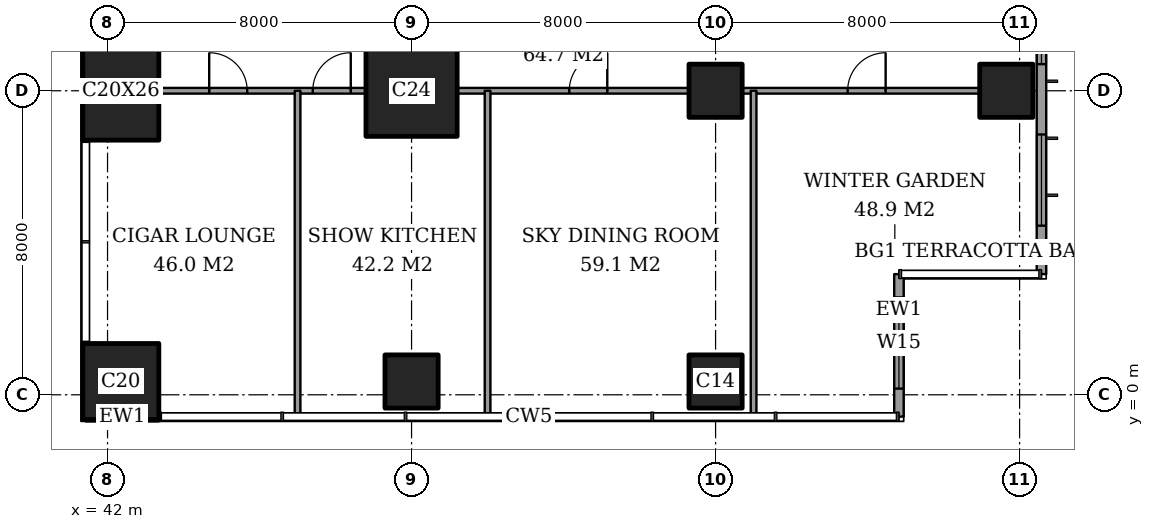
"""IFC4 building model, lengths in metres.
Left out: names, types, materials, properties, quantities, classifications, styles, units other than length and angle.
Written with IfcOpenShell. Run it as: python <this file> out.ifc"""

import sys

from ifc_helpers import new_model, si_unit, direction, frame, frame_2d, origin, origin_2d, place, context, subcontext, project, spatial, rectangle, extrude, element, fill, save


model = new_model("IFC4")
c1 = context("Model", 3, precision=1e-05, world=origin(), true_north=direction((0.0, 1.0)))
c2 = subcontext(c1, "Body", "Model", "MODEL_VIEW")
j1 = project(units=[si_unit("LENGTHUNIT", "METRE"), si_unit("PLANEANGLEUNIT", "RADIAN")], contexts=[c1])
p1 = place(None, origin())
s1 = spatial("IfcSite", under=j1, at=p1, CompositionType="ELEMENT")
p2 = place(p1, origin())
s2 = spatial("IfcBuilding", under=s1, at=p2, CompositionType="ELEMENT")
p3 = place(p2, frame((0.0, 0.0, 287.1)))
s3 = spatial("IfcBuildingStorey", under=s2, at=p3, CompositionType="ELEMENT", Elevation=287.1)
p4 = place(p3, frame((42.35, 0.35, 0.0), z_axis=(0.0, 0.0, 1.0), x_axis=(1.0, 0.0, 0.0)))
e1 = element("IfcColumn", 1, at=p4, inside=s3, PredefinedType="COLUMN", context=c2, shape_type="SweptSolid", body=[
    extrude(rectangle(XDim=2.0, YDim=2.0, at=origin_2d()), origin(), (0.0, 0.0, 1.0), 4.5),
])
p5 = place(p3, frame((42.35, 8.0, 0.0), z_axis=(0.0, 0.0, 1.0), x_axis=(1.0, 0.0, 0.0)))
e2 = element("IfcColumn", 2, at=p5, inside=s3, PredefinedType="COLUMN", context=c2, shape_type="SweptSolid", body=[
    extrude(rectangle(XDim=2.0, YDim=2.6, at=origin_2d()), origin(), (0.0, 0.0, 1.0), 4.5),
])
p6 = place(p3, frame((50.0, 0.35, 0.0), z_axis=(0.0, 0.0, 1.0), x_axis=(1.0, 0.0, 0.0)))
e3 = element("IfcColumn", 3, at=p6, inside=s3, PredefinedType="COLUMN", context=c2, shape_type="SweptSolid", body=[
    extrude(rectangle(XDim=1.4, YDim=1.4, at=origin_2d()), origin(), (0.0, 0.0, 1.0), 4.5),
])
p7 = place(p3, frame((50.0, 8.0, 0.0), z_axis=(0.0, 0.0, 1.0), x_axis=(1.0, 0.0, 0.0)))
e4 = element("IfcColumn", 4, at=p7, inside=s3, PredefinedType="COLUMN", context=c2, shape_type="SweptSolid", body=[
    extrude(rectangle(XDim=2.4, YDim=2.4, at=origin_2d()), origin(), (0.0, 0.0, 1.0), 4.5),
])
for number, where, z_axis, x_axis in (
    (5, (58.0, 0.35, 0.0), (0.0, 0.0, 1.0), (1.0, 0.0, 0.0)),
    (6, (58.0, 8.0, 0.0), (0.0, 0.0, 1.0), (1.0, 0.0, 0.0)),
    (7, (65.65, 8.0, 0.0), (0.0, 0.0, 1.0), (1.0, 0.0, 0.0)),
):
    element("IfcColumn", number, at=place(p3, frame(where, z_axis=z_axis, x_axis=x_axis)), inside=s3, PredefinedType="COLUMN", context=c2, shape_type="SweptSolid", body=[
        extrude(rectangle(XDim=1.4, YDim=1.4, at=origin_2d()), origin(), (0.0, 0.0, 1.0), 4.5),
    ])
p8 = place(p3, frame((41.425, -0.575, 0.0), z_axis=(0.0, 0.0, 1.0), x_axis=(1.0, 0.0, 0.0)))
e8 = element("IfcWall", 8, at=p8, inside=s3, PredefinedType="SOLIDWALL", context=c2, shape_type="SweptSolid", body=[
    extrude(rectangle(XDim=1.925, YDim=0.25, at=frame_2d((0.962, 0.0))), origin(), (0.0, 0.0, 1.0), 4.5),
])
p9 = place(p3, frame((62.825, -0.575, 0.0), z_axis=(0.0, 0.0, 1.0), x_axis=(0.0, 1.0, 0.0)))
e9 = element("IfcWall", 9, at=p9, inside=s3, PredefinedType="SOLIDWALL", context=c2, shape_type="SweptSolid", body=[
    extrude(rectangle(XDim=3.75, YDim=0.25, at=frame_2d((1.875, 0.0))), origin(), (0.0, 0.0, 1.0), 4.5),
])
p10 = place(p9, frame((0.738, 0.0, 0.6)))
e10 = element("IfcOpeningElement", 10, at=p10, cuts=e9, PredefinedType="OPENING", context=c2, shape_type="SweptSolid", body=[
    extrude(rectangle(XDim=2.4, YDim=2.8, at=frame_2d((1.2, 1.4))), frame((0.0, 0.135, 0.0), z_axis=(0.0, -1.0, 0.0), x_axis=(1.0, 0.0, 0.0)), (0.0, 0.0, 1.0), 0.27),
])
p11 = place(p3, frame((66.575, 3.175, 0.0), z_axis=(0.0, 0.0, 1.0), x_axis=(0.0, 1.0, 0.0)))
e11 = element("IfcWall", 11, at=p11, inside=s3, PredefinedType="SOLIDWALL", context=c2, shape_type="SweptSolid", body=[
    extrude(rectangle(XDim=41.65, YDim=0.25, at=frame_2d((20.825, 0.0))), origin(), (0.0, 0.0, 1.0), 4.5),
])
p12 = place(p11, frame((1.275, 0.0, 0.6)))
e12 = element("IfcOpeningElement", 12, at=p12, cuts=e11, PredefinedType="OPENING", context=c2, shape_type="SweptSolid", body=[
    extrude(rectangle(XDim=2.4, YDim=2.8, at=frame_2d((1.2, 1.4))), frame((0.0, 0.135, 0.0), z_axis=(0.0, -1.0, 0.0), x_axis=(1.0, 0.0, 0.0)), (0.0, 0.0, 1.0), 0.27),
])
p13 = place(p11, frame((5.525, 0.0, 0.6)))
e13 = element("IfcOpeningElement", 13, at=p13, cuts=e11, PredefinedType="OPENING", context=c2, shape_type="SweptSolid", body=[
    extrude(rectangle(XDim=1.2, YDim=2.8, at=frame_2d((0.6, 1.4))), frame((0.0, 0.135, 0.0), z_axis=(0.0, -1.0, 0.0), x_axis=(1.0, 0.0, 0.0)), (0.0, 0.0, 1.0), 0.27),
])
p14 = place(p11, frame((9.425, 0.0, 0.6)))
e14 = element("IfcOpeningElement", 14, at=p14, cuts=e11, PredefinedType="OPENING", context=c2, shape_type="SweptSolid", body=[
    extrude(rectangle(XDim=2.4, YDim=2.8, at=frame_2d((1.2, 1.4))), frame((0.0, 0.135, 0.0), z_axis=(0.0, -1.0, 0.0), x_axis=(1.0, 0.0, 0.0)), (0.0, 0.0, 1.0), 0.27),
])
p15 = place(p11, frame((14.525, 0.0, 0.6)))
e15 = element("IfcOpeningElement", 15, at=p15, cuts=e11, PredefinedType="OPENING", context=c2, shape_type="SweptSolid", body=[
    extrude(rectangle(XDim=2.4, YDim=2.8, at=frame_2d((1.2, 1.4))), frame((0.0, 0.135, 0.0), z_axis=(0.0, -1.0, 0.0), x_axis=(1.0, 0.0, 0.0)), (0.0, 0.0, 1.0), 0.27),
])
p16 = place(p11, frame((17.725, 0.0, 0.6)))
e16 = element("IfcOpeningElement", 16, at=p16, cuts=e11, PredefinedType="OPENING", context=c2, shape_type="SweptSolid", body=[
    extrude(rectangle(XDim=2.4, YDim=2.8, at=frame_2d((1.2, 1.4))), frame((0.0, 0.135, 0.0), z_axis=(0.0, -1.0, 0.0), x_axis=(1.0, 0.0, 0.0)), (0.0, 0.0, 1.0), 0.27),
])
p17 = place(p11, frame((21.525, 0.0, 0.6)))
e17 = element("IfcOpeningElement", 17, at=p17, cuts=e11, PredefinedType="OPENING", context=c2, shape_type="SweptSolid", body=[
    extrude(rectangle(XDim=2.4, YDim=2.8, at=frame_2d((1.2, 1.4))), frame((0.0, 0.135, 0.0), z_axis=(0.0, -1.0, 0.0), x_axis=(1.0, 0.0, 0.0)), (0.0, 0.0, 1.0), 0.27),
])
p18 = place(p11, frame((24.725, 0.0, 0.6)))
e18 = element("IfcOpeningElement", 18, at=p18, cuts=e11, PredefinedType="OPENING", context=c2, shape_type="SweptSolid", body=[
    extrude(rectangle(XDim=2.4, YDim=2.8, at=frame_2d((1.2, 1.4))), frame((0.0, 0.135, 0.0), z_axis=(0.0, -1.0, 0.0), x_axis=(1.0, 0.0, 0.0)), (0.0, 0.0, 1.0), 0.27),
])
p19 = place(p11, frame((29.825, 0.0, 0.6)))
e19 = element("IfcOpeningElement", 19, at=p19, cuts=e11, PredefinedType="OPENING", context=c2, shape_type="SweptSolid", body=[
    extrude(rectangle(XDim=2.4, YDim=2.8, at=frame_2d((1.2, 1.4))), frame((0.0, 0.135, 0.0), z_axis=(0.0, -1.0, 0.0), x_axis=(1.0, 0.0, 0.0)), (0.0, 0.0, 1.0), 0.27),
])
p20 = place(p11, frame((35.025, 0.0, 0.6)))
e20 = element("IfcOpeningElement", 20, at=p20, cuts=e11, PredefinedType="OPENING", context=c2, shape_type="SweptSolid", body=[
    extrude(rectangle(XDim=1.2, YDim=2.8, at=frame_2d((0.6, 1.4))), frame((0.0, 0.135, 0.0), z_axis=(0.0, -1.0, 0.0), x_axis=(1.0, 0.0, 0.0)), (0.0, 0.0, 1.0), 0.27),
])
p21 = place(p11, frame((38.075, 0.0, 0.6)))
e21 = element("IfcOpeningElement", 21, at=p21, cuts=e11, PredefinedType="OPENING", context=c2, shape_type="SweptSolid", body=[
    extrude(rectangle(XDim=2.4, YDim=2.8, at=frame_2d((1.2, 1.4))), frame((0.0, 0.135, 0.0), z_axis=(0.0, -1.0, 0.0), x_axis=(1.0, 0.0, 0.0)), (0.0, 0.0, 1.0), 0.27),
])
p22 = place(p3, frame((43.35, 8.0, 0.0), z_axis=(0.0, 0.0, 1.0), x_axis=(1.0, 0.0, 0.0)))
e22 = element("IfcWall", 22, at=p22, inside=s3, PredefinedType="PARTITIONING", context=c2, shape_type="SweptSolid", body=[
    extrude(rectangle(XDim=5.45, YDim=0.15, at=frame_2d((2.725, 0.0))), origin(), (0.0, 0.0, 1.0), 4.2),
])
p23 = place(p22, frame((4.05, 0.0, 0.0)))
e23 = element("IfcOpeningElement", 23, at=p23, cuts=e22, PredefinedType="OPENING", context=c2, shape_type="SweptSolid", body=[
    extrude(rectangle(XDim=1.0, YDim=2.1, at=frame_2d((0.5, 1.05))), frame((0.0, 0.085, 0.0), z_axis=(0.0, -1.0, 0.0), x_axis=(1.0, 0.0, 0.0)), (0.0, 0.0, 1.0), 0.17),
])
p24 = place(p22, frame((1.325, 0.0, 0.0)))
e24 = element("IfcOpeningElement", 24, at=p24, cuts=e22, PredefinedType="OPENING", context=c2, shape_type="SweptSolid", body=[
    extrude(rectangle(XDim=1.0, YDim=2.1, at=frame_2d((0.5, 1.05))), frame((0.0, 0.085, 0.0), z_axis=(0.0, -1.0, 0.0), x_axis=(1.0, 0.0, 0.0)), (0.0, 0.0, 1.0), 0.17),
])
p25 = place(p3, frame((51.2, 8.0, 0.0), z_axis=(0.0, 0.0, 1.0), x_axis=(1.0, 0.0, 0.0)))
e25 = element("IfcWall", 25, at=p25, inside=s3, PredefinedType="PARTITIONING", context=c2, shape_type="SweptSolid", body=[
    extrude(rectangle(XDim=6.1, YDim=0.15, at=frame_2d((3.05, 0.0))), origin(), (0.0, 0.0, 1.0), 4.2),
])
p26 = place(p25, frame((2.95, 0.0, 0.0)))
e26 = element("IfcOpeningElement", 26, at=p26, cuts=e25, PredefinedType="OPENING", context=c2, shape_type="SweptSolid", body=[
    extrude(rectangle(XDim=1.0, YDim=2.1, at=frame_2d((0.5, 1.05))), frame((0.0, 0.085, 0.0), z_axis=(0.0, -1.0, 0.0), x_axis=(1.0, 0.0, 0.0)), (0.0, 0.0, 1.0), 0.17),
])
p27 = place(p3, frame((58.7, 8.0, 0.0), z_axis=(0.0, 0.0, 1.0), x_axis=(1.0, 0.0, 0.0)))
e27 = element("IfcWall", 27, at=p27, inside=s3, PredefinedType="PARTITIONING", context=c2, shape_type="SweptSolid", body=[
    extrude(rectangle(XDim=6.25, YDim=0.15, at=frame_2d((3.125, 0.0))), origin(), (0.0, 0.0, 1.0), 4.2),
])
p28 = place(p27, frame((2.775, 0.0, 0.0)))
e28 = element("IfcOpeningElement", 28, at=p28, cuts=e27, PredefinedType="OPENING", context=c2, shape_type="SweptSolid", body=[
    extrude(rectangle(XDim=1.0, YDim=2.1, at=frame_2d((0.5, 1.05))), frame((0.0, 0.085, 0.0), z_axis=(0.0, -1.0, 0.0), x_axis=(1.0, 0.0, 0.0)), (0.0, 0.0, 1.0), 0.17),
])
for number, where, z_axis, x_axis in (
    (29, (47.0, -0.561, 0.0), (0.0, 0.0, 1.0), (0.0, 1.0, 0.0)),
    (30, (52.0, -0.561, 0.0), (0.0, 0.0, 1.0), (0.0, 1.0, 0.0)),
    (31, (59.0, -0.561, 0.0), (0.0, 0.0, 1.0), (0.0, 1.0, 0.0)),
):
    element("IfcWall", number, at=place(p3, frame(where, z_axis=z_axis, x_axis=x_axis)), inside=s3, PredefinedType="PARTITIONING", context=c2, shape_type="SweptSolid", body=[
        extrude(rectangle(XDim=8.561, YDim=0.15, at=frame_2d((4.281, 0.0))), origin(), (0.0, 0.0, 1.0), 4.2),
    ])
p29 = place(p10, origin())
e32 = element("IfcWindow", 32, at=p29, inside=s3, PartitioningType="SINGLE_PANEL", PredefinedType="WINDOW", context=c2, shape_type="SweptSolid", body=[
    extrude(rectangle(XDim=2.4, YDim=2.8, at=frame_2d((1.2, 1.4))), frame((0.0, 0.03, 0.0), z_axis=(0.0, -1.0, 0.0), x_axis=(1.0, 0.0, 0.0)), (0.0, 0.0, 1.0), 0.06),
])
fill(e10, e32)
p30 = place(p12, origin())
e33 = element("IfcWindow", 33, at=p30, inside=s3, PartitioningType="SINGLE_PANEL", PredefinedType="WINDOW", context=c2, shape_type="SweptSolid", body=[
    extrude(rectangle(XDim=2.4, YDim=2.8, at=frame_2d((1.2, 1.4))), frame((0.0, 0.03, 0.0), z_axis=(0.0, -1.0, 0.0), x_axis=(1.0, 0.0, 0.0)), (0.0, 0.0, 1.0), 0.06),
])
fill(e12, e33)
p31 = place(p13, origin())
e34 = element("IfcWindow", 34, at=p31, inside=s3, PartitioningType="SINGLE_PANEL", PredefinedType="WINDOW", context=c2, shape_type="SweptSolid", body=[
    extrude(rectangle(XDim=1.2, YDim=2.8, at=frame_2d((0.6, 1.4))), frame((0.0, 0.03, 0.0), z_axis=(0.0, -1.0, 0.0), x_axis=(1.0, 0.0, 0.0)), (0.0, 0.0, 1.0), 0.06),
])
fill(e13, e34)
p32 = place(p28, origin())
e35 = element("IfcDoor", 35, at=p32, inside=s3, OperationType="SINGLE_SWING_LEFT", PredefinedType="DOOR", context=c2, shape_type="SweptSolid", body=[
    extrude(rectangle(XDim=1.0, YDim=2.1, at=frame_2d((0.5, 1.05))), frame((0.0, 0.025, 0.0), z_axis=(0.0, -1.0, 0.0), x_axis=(1.0, 0.0, 0.0)), (0.0, 0.0, 1.0), 0.05),
])
fill(e28, e35)
p33 = place(p26, origin())
e36 = element("IfcDoor", 36, at=p33, inside=s3, OperationType="SINGLE_SWING_LEFT", PredefinedType="DOOR", context=c2, shape_type="SweptSolid", body=[
    extrude(rectangle(XDim=1.0, YDim=2.1, at=frame_2d((0.5, 1.05))), frame((0.0, 0.025, 0.0), z_axis=(0.0, -1.0, 0.0), x_axis=(1.0, 0.0, 0.0)), (0.0, 0.0, 1.0), 0.05),
])
fill(e26, e36)
p34 = place(p23, origin())
e37 = element("IfcDoor", 37, at=p34, inside=s3, OperationType="SINGLE_SWING_LEFT", PredefinedType="DOOR", context=c2, shape_type="SweptSolid", body=[
    extrude(rectangle(XDim=1.0, YDim=2.1, at=frame_2d((0.5, 1.05))), frame((0.0, 0.025, 0.0), z_axis=(0.0, -1.0, 0.0), x_axis=(1.0, 0.0, 0.0)), (0.0, 0.0, 1.0), 0.05),
])
fill(e23, e37)
p35 = place(p24, origin())
e38 = element("IfcDoor", 38, at=p35, inside=s3, OperationType="SINGLE_SWING_RIGHT", PredefinedType="DOOR", context=c2, shape_type="SweptSolid", body=[
    extrude(rectangle(XDim=1.0, YDim=2.1, at=frame_2d((0.5, 1.05))), frame((0.0, 0.025, 0.0), z_axis=(0.0, -1.0, 0.0), x_axis=(1.0, 0.0, 0.0)), (0.0, 0.0, 1.0), 0.05),
])
fill(e24, e38)
save(model, sys.argv[1])
